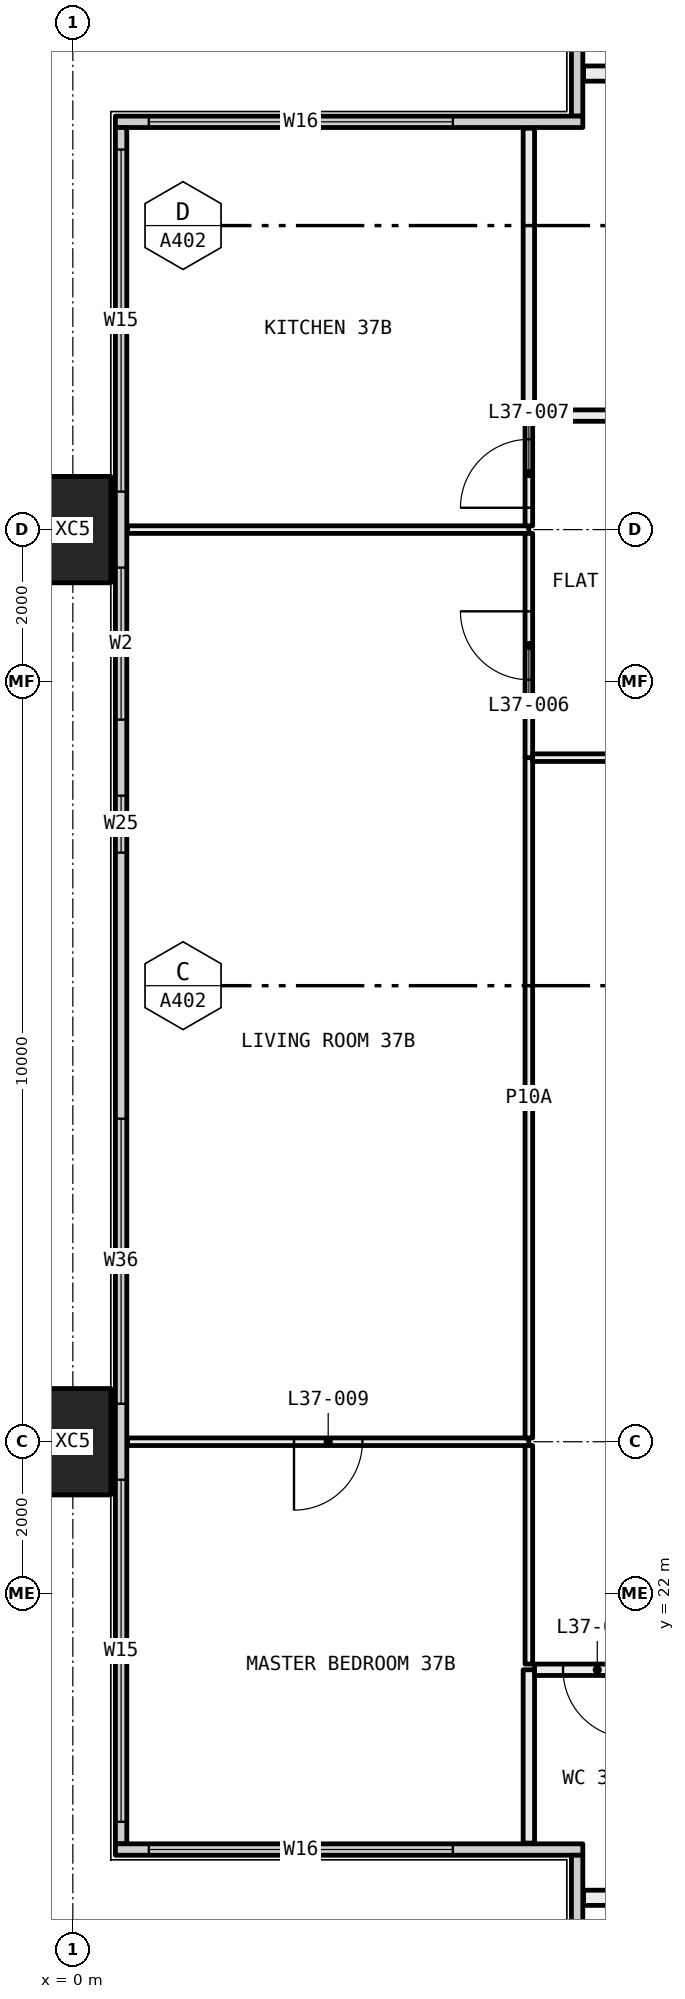
"""IFC4 building model, lengths in metres.
Left out: names, types, materials, properties, quantities, classifications, styles, units other than length and angle.
Written with IfcOpenShell. Run it as: python <this file> out.ifc"""

import sys

from ifc_helpers import new_model, si_unit, direction, frame, frame_2d, origin, origin_2d, place, context, subcontext, project, spatial, rectangle, hollow_rectangle, extrude, element, fill, save


model = new_model("IFC4")
c1 = context("Model", 3, precision=1e-05, world=origin(), true_north=direction((0.0, 1.0)))
c2 = subcontext(c1, "Body", "Model", "MODEL_VIEW")
j1 = project(units=[si_unit("LENGTHUNIT", "METRE"), si_unit("PLANEANGLEUNIT", "RADIAN")], contexts=[c1])
p1 = place(None, origin())
s1 = spatial("IfcSite", under=j1, at=p1, CompositionType="ELEMENT")
p2 = place(p1, origin())
s2 = spatial("IfcBuilding", under=s1, at=p2, CompositionType="ELEMENT")
p3 = place(p2, frame((0.0, 0.0, 141.45)))
s3 = spatial("IfcBuildingStorey", under=s2, at=p3, CompositionType="ELEMENT", Elevation=141.45)
for number, where, z_axis, x_axis in (
    (1, (0.0, 24.0, -0.4), (0.0, 0.0, 1.0), (0.0, 1.0, 0.0)),
    (2, (0.0, 36.0, -0.4), (0.0, 0.0, 1.0), (0.0, 1.0, 0.0)),
):
    element("IfcColumn", number, at=place(p3, frame(where, z_axis=z_axis, x_axis=x_axis)), inside=s3, PredefinedType="COLUMN", context=c2, shape_type="SweptSolid", body=[
        extrude(hollow_rectangle(XDim=1.4, YDim=1.0, WallThickness=0.055, at=origin_2d()), origin(), (0.0, 0.0, 1.0), 3.45),
    ])
p4 = place(p3, frame((6.635, 41.44, 0.0), z_axis=(0.0, 0.0, 1.0), x_axis=(0.0, 1.0, 0.0)))
e3 = element("IfcWall", 3, at=p4, inside=s3, PredefinedType="ELEMENTEDWALL", context=c2, shape_type="SweptSolid", body=[
    extrude(rectangle(XDim=5.85, YDim=0.15, at=frame_2d((2.925, 0.0))), origin(), (0.0, 0.0, 1.0), 3.05),
])
p5 = place(p4, frame((1.56, 0.0, 0.45)))
e4 = element("IfcOpeningElement", 4, at=p5, cuts=e3, PredefinedType="OPENING", context=c2, shape_type="SweptSolid", body=[
    extrude(rectangle(XDim=4.0, YDim=2.55, at=frame_2d((2.0, 1.275))), frame((0.0, 0.085, 0.0), z_axis=(0.0, -1.0, 0.0), x_axis=(1.0, 0.0, 0.0)), (0.0, 0.0, 1.0), 0.17),
])
p6 = place(p3, frame((0.56, 41.365, 0.0), z_axis=(0.0, 0.0, 1.0), x_axis=(1.0, 0.0, 0.0)))
e5 = element("IfcWall", 5, at=p6, inside=s3, PredefinedType="ELEMENTEDWALL", context=c2, shape_type="SweptSolid", body=[
    extrude(rectangle(XDim=6.15, YDim=0.15, at=frame_2d((3.075, 0.0))), origin(), (0.0, 0.0, 1.0), 3.05),
])
p7 = place(p6, frame((0.44, 0.0, 0.45)))
e6 = element("IfcOpeningElement", 6, at=p7, cuts=e5, PredefinedType="OPENING", context=c2, shape_type="SweptSolid", body=[
    extrude(rectangle(XDim=4.0, YDim=2.55, at=frame_2d((2.0, 1.275))), frame((0.0, 0.085, 0.0), z_axis=(0.0, -1.0, 0.0), x_axis=(1.0, 0.0, 0.0)), (0.0, 0.0, 1.0), 0.17),
])
p8 = place(p3, frame((0.635, 18.71, 0.0), z_axis=(0.0, 0.0, 1.0), x_axis=(0.0, 1.0, 0.0)))
e7 = element("IfcWall", 7, at=p8, inside=s3, PredefinedType="ELEMENTEDWALL", context=c2, shape_type="SweptSolid", body=[
    extrude(rectangle(XDim=22.58, YDim=0.15, at=frame_2d((11.29, 0.0))), origin(), (0.0, 0.0, 1.0), 3.05),
])
p9 = place(p8, frame((0.29, 0.0, 0.45)))
e8 = element("IfcOpeningElement", 8, at=p9, cuts=e7, PredefinedType="OPENING", context=c2, shape_type="SweptSolid", body=[
    extrude(rectangle(XDim=4.5, YDim=2.55, at=frame_2d((2.25, 1.275))), frame((0.0, 0.085, 0.0), z_axis=(0.0, -1.0, 0.0), x_axis=(1.0, 0.0, 0.0)), (0.0, 0.0, 1.0), 0.17),
])
p10 = place(p8, frame((5.79, 0.0, 0.45)))
e9 = element("IfcOpeningElement", 9, at=p10, cuts=e7, PredefinedType="OPENING", context=c2, shape_type="SweptSolid", body=[
    extrude(rectangle(XDim=3.75, YDim=2.55, at=frame_2d((1.875, 1.275))), frame((0.0, 0.085, 0.0), z_axis=(0.0, -1.0, 0.0), x_axis=(1.0, 0.0, 0.0)), (0.0, 0.0, 1.0), 0.17),
])
p11 = place(p8, frame((13.04, 0.0, 0.45)))
e10 = element("IfcOpeningElement", 10, at=p11, cuts=e7, PredefinedType="OPENING", context=c2, shape_type="SweptSolid", body=[
    extrude(rectangle(XDim=0.75, YDim=2.55, at=frame_2d((0.375, 1.275))), frame((0.0, 0.085, 0.0), z_axis=(0.0, -1.0, 0.0), x_axis=(1.0, 0.0, 0.0)), (0.0, 0.0, 1.0), 0.17),
])
p12 = place(p8, frame((14.79, 0.0, 0.45)))
e11 = element("IfcOpeningElement", 11, at=p12, cuts=e7, PredefinedType="OPENING", context=c2, shape_type="SweptSolid", body=[
    extrude(rectangle(XDim=2.0, YDim=2.55, at=frame_2d((1.0, 1.275))), frame((0.0, 0.085, 0.0), z_axis=(0.0, -1.0, 0.0), x_axis=(1.0, 0.0, 0.0)), (0.0, 0.0, 1.0), 0.17),
])
p13 = place(p8, frame((17.79, 0.0, 0.45)))
e12 = element("IfcOpeningElement", 12, at=p13, cuts=e7, PredefinedType="OPENING", context=c2, shape_type="SweptSolid", body=[
    extrude(rectangle(XDim=4.5, YDim=2.55, at=frame_2d((2.25, 1.275))), frame((0.0, 0.085, 0.0), z_axis=(0.0, -1.0, 0.0), x_axis=(1.0, 0.0, 0.0)), (0.0, 0.0, 1.0), 0.17),
])
p14 = place(p3, frame((0.56, 18.635, 0.0), z_axis=(0.0, 0.0, 1.0), x_axis=(1.0, 0.0, 0.0)))
e13 = element("IfcWall", 13, at=p14, inside=s3, PredefinedType="ELEMENTEDWALL", context=c2, shape_type="SweptSolid", body=[
    extrude(rectangle(XDim=6.15, YDim=0.15, at=frame_2d((3.075, 0.0))), origin(), (0.0, 0.0, 1.0), 3.05),
])
p15 = place(p14, frame((0.44, 0.0, 0.45)))
e14 = element("IfcOpeningElement", 14, at=p15, cuts=e13, PredefinedType="OPENING", context=c2, shape_type="SweptSolid", body=[
    extrude(rectangle(XDim=4.0, YDim=2.55, at=frame_2d((2.0, 1.275))), frame((0.0, 0.085, 0.0), z_axis=(0.0, -1.0, 0.0), x_axis=(1.0, 0.0, 0.0)), (0.0, 0.0, 1.0), 0.17),
])
p16 = place(p3, frame((6.635, 12.71, 0.0), z_axis=(0.0, 0.0, 1.0), x_axis=(0.0, 1.0, 0.0)))
e15 = element("IfcWall", 15, at=p16, inside=s3, PredefinedType="ELEMENTEDWALL", context=c2, shape_type="SweptSolid", body=[
    extrude(rectangle(XDim=5.85, YDim=0.15, at=frame_2d((2.925, 0.0))), origin(), (0.0, 0.0, 1.0), 3.05),
])
p17 = place(p16, frame((0.29, 0.0, 0.45)))
e16 = element("IfcOpeningElement", 16, at=p17, cuts=e15, PredefinedType="OPENING", context=c2, shape_type="SweptSolid", body=[
    extrude(rectangle(XDim=4.0, YDim=2.55, at=frame_2d((2.0, 1.275))), frame((0.0, 0.085, 0.0), z_axis=(0.0, -1.0, 0.0), x_axis=(1.0, 0.0, 0.0)), (0.0, 0.0, 1.0), 0.17),
])
p18 = place(p3, frame((7.8, 18.0, 0.0), z_axis=(0.0, 0.0, 1.0), x_axis=(-1.0, 0.0, 0.0)))
e17 = element("IfcWall", 17, at=p18, inside=s3, PredefinedType="PARTITIONING", context=c2, shape_type="SweptSolid", body=[
    extrude(rectangle(XDim=1.08, YDim=0.2, at=frame_2d((0.54, 0.0))), origin(), (0.0, 0.0, 1.0), 3.05),
])
p19 = place(p3, frame((6.0, 24.0, 0.0), z_axis=(0.0, 0.0, 1.0), x_axis=(-1.0, 0.0, 0.0)))
e18 = element("IfcWall", 18, at=p19, inside=s3, PredefinedType="PARTITIONING", context=c2, shape_type="SweptSolid", body=[
    extrude(rectangle(XDim=5.28, YDim=0.1, at=frame_2d((2.64, 0.0))), origin(), (0.0, 0.0, 1.0), 2.45),
])
p20 = place(p19, frame((2.19, 0.0, 0.0)))
e19 = element("IfcOpeningElement", 19, at=p20, cuts=e18, PredefinedType="OPENING", context=c2, shape_type="SweptSolid", body=[
    extrude(rectangle(XDim=0.9, YDim=2.1, at=frame_2d((0.45, 1.05))), frame((0.0, 0.06, 0.0), z_axis=(0.0, -1.0, 0.0), x_axis=(1.0, 0.0, 0.0)), (0.0, 0.0, 1.0), 0.12),
])
p21 = place(p3, frame((6.0, 18.72, 0.0), z_axis=(0.0, 0.0, 1.0), x_axis=(0.0, 1.0, 0.0)))
e20 = element("IfcWall", 20, at=p21, inside=s3, PredefinedType="PARTITIONING", context=c2, shape_type="SweptSolid", body=[
    extrude(rectangle(XDim=2.28, YDim=0.15, at=frame_2d((1.14, 0.0))), origin(), (0.0, 0.0, 1.0), 3.05),
])
p22 = place(p3, frame((6.0, 21.075, 0.0), z_axis=(0.0, 0.0, 1.0), x_axis=(0.0, 1.0, 0.0)))
e21 = element("IfcWall", 21, at=p22, inside=s3, PredefinedType="PARTITIONING", context=c2, shape_type="SweptSolid", body=[
    extrude(rectangle(XDim=2.875, YDim=0.1, at=frame_2d((1.438, 0.0))), origin(), (0.0, 0.0, 1.0), 2.45),
])
p23 = place(p3, frame((6.0, 36.0, 0.0), z_axis=(0.0, 0.0, 1.0), x_axis=(-1.0, 0.0, 0.0)))
e22 = element("IfcWall", 22, at=p23, inside=s3, PredefinedType="PARTITIONING", context=c2, shape_type="SweptSolid", body=[
    extrude(rectangle(XDim=5.28, YDim=0.1, at=frame_2d((2.64, 0.0))), origin(), (0.0, 0.0, 1.0), 2.45),
])
p24 = place(p3, frame((6.0, 24.05, 0.0), z_axis=(0.0, 0.0, 1.0), x_axis=(0.0, 1.0, 0.0)))
e23 = element("IfcWall", 23, at=p24, inside=s3, PredefinedType="PARTITIONING", context=c2, shape_type="SweptSolid", body=[
    extrude(rectangle(XDim=8.95, YDim=0.1, at=frame_2d((4.475, 0.0))), origin(), (0.0, 0.0, 1.0), 2.45),
])
p25 = place(p3, frame((6.0, 33.0, 0.0), z_axis=(0.0, 0.0, 1.0), x_axis=(0.0, 1.0, 0.0)))
e24 = element("IfcWall", 24, at=p25, inside=s3, PredefinedType="PARTITIONING", context=c2, shape_type="SweptSolid", body=[
    extrude(rectangle(XDim=2.95, YDim=0.1, at=frame_2d((1.475, 0.0))), origin(), (0.0, 0.0, 1.0), 2.45),
])
p26 = place(p25, frame((1.025, 0.0, 0.0)))
e25 = element("IfcOpeningElement", 25, at=p26, cuts=e24, PredefinedType="OPENING", context=c2, shape_type="SweptSolid", body=[
    extrude(rectangle(XDim=0.9, YDim=2.1, at=frame_2d((0.45, 1.05))), frame((0.0, 0.06, 0.0), z_axis=(0.0, -1.0, 0.0), x_axis=(1.0, 0.0, 0.0)), (0.0, 0.0, 1.0), 0.12),
])
p27 = place(p3, frame((6.0, 36.05, 0.0), z_axis=(0.0, 0.0, 1.0), x_axis=(0.0, 1.0, 0.0)))
e26 = element("IfcWall", 26, at=p27, inside=s3, PredefinedType="PARTITIONING", context=c2, shape_type="SweptSolid", body=[
    extrude(rectangle(XDim=1.375, YDim=0.1, at=frame_2d((0.688, 0.0))), origin(), (0.0, 0.0, 1.0), 2.45),
])
p28 = place(p27, frame((0.238, 0.0, 0.0)))
e27 = element("IfcOpeningElement", 27, at=p28, cuts=e26, PredefinedType="OPENING", context=c2, shape_type="SweptSolid", body=[
    extrude(rectangle(XDim=0.9, YDim=2.1, at=frame_2d((0.45, 1.05))), frame((0.0, 0.06, 0.0), z_axis=(0.0, -1.0, 0.0), x_axis=(1.0, 0.0, 0.0)), (0.0, 0.0, 1.0), 0.12),
])
p29 = place(p3, frame((6.0, 37.5, 0.0), z_axis=(0.0, 0.0, 1.0), x_axis=(0.0, 1.0, 0.0)))
e28 = element("IfcWall", 28, at=p29, inside=s3, PredefinedType="PARTITIONING", context=c2, shape_type="SweptSolid", body=[
    extrude(rectangle(XDim=3.78, YDim=0.15, at=frame_2d((1.89, 0.0))), origin(), (0.0, 0.0, 1.0), 3.05),
])
p30 = place(p3, frame((7.725, 21.0, 0.0), z_axis=(0.0, 0.0, 1.0), x_axis=(-1.0, 0.0, 0.0)))
e29 = element("IfcWall", 29, at=p30, inside=s3, PredefinedType="PARTITIONING", context=c2, shape_type="SweptSolid", body=[
    extrude(rectangle(XDim=1.65, YDim=0.15, at=frame_2d((0.825, 0.0))), origin(), (0.0, 0.0, 1.0), 3.05),
])
p31 = place(p30, frame((0.375, 0.0, 0.0)))
e30 = element("IfcOpeningElement", 30, at=p31, cuts=e29, PredefinedType="OPENING", context=c2, shape_type="SweptSolid", body=[
    extrude(rectangle(XDim=0.9, YDim=2.1, at=frame_2d((0.45, 1.05))), frame((0.0, 0.085, 0.0), z_axis=(0.0, -1.0, 0.0), x_axis=(1.0, 0.0, 0.0)), (0.0, 0.0, 1.0), 0.17),
])
p32 = place(p3, frame((10.0, 33.0, 0.0), z_axis=(0.0, 0.0, 1.0), x_axis=(-1.0, 0.0, 0.0)))
e31 = element("IfcWall", 31, at=p32, inside=s3, PredefinedType="PARTITIONING", context=c2, shape_type="SweptSolid", body=[
    extrude(rectangle(XDim=3.95, YDim=0.1, at=frame_2d((1.975, 0.0))), origin(), (0.0, 0.0, 1.0), 3.05),
])
p33 = place(p32, frame((1.525, 0.0, 0.0)))
e32 = element("IfcOpeningElement", 32, at=p33, cuts=e31, PredefinedType="OPENING", context=c2, shape_type="SweptSolid", body=[
    extrude(rectangle(XDim=0.9, YDim=2.1, at=frame_2d((0.45, 1.05))), frame((0.0, 0.06, 0.0), z_axis=(0.0, -1.0, 0.0), x_axis=(1.0, 0.0, 0.0)), (0.0, 0.0, 1.0), 0.12),
])
p34 = place(p3, frame((10.0, 37.5, 0.0), z_axis=(0.0, 0.0, 1.0), x_axis=(-1.0, 0.0, 0.0)))
e33 = element("IfcWall", 33, at=p34, inside=s3, PredefinedType="PARTITIONING", context=c2, shape_type="SweptSolid", body=[
    extrude(rectangle(XDim=3.925, YDim=0.15, at=frame_2d((1.962, 0.0))), origin(), (0.0, 0.0, 1.0), 3.05),
])
p35 = place(p34, frame((1.512, 0.0, 0.0)))
e34 = element("IfcOpeningElement", 34, at=p35, cuts=e33, PredefinedType="OPENING", context=c2, shape_type="SweptSolid", body=[
    extrude(rectangle(XDim=0.9, YDim=2.1, at=frame_2d((0.45, 1.05))), frame((0.0, 0.085, 0.0), z_axis=(0.0, -1.0, 0.0), x_axis=(1.0, 0.0, 0.0)), (0.0, 0.0, 1.0), 0.17),
])
p36 = place(p3, frame((10.1, 42.0, 0.0), z_axis=(0.0, 0.0, 1.0), x_axis=(-1.0, 0.0, 0.0)))
e35 = element("IfcWall", 35, at=p36, inside=s3, PredefinedType="PARTITIONING", context=c2, shape_type="SweptSolid", body=[
    extrude(rectangle(XDim=3.38, YDim=0.2, at=frame_2d((1.69, 0.0))), origin(), (0.0, 0.0, 1.0), 3.05),
])
p37 = place(p7, origin())
e36 = element("IfcWindow", 36, at=p37, inside=s3, PartitioningType="SINGLE_PANEL", PredefinedType="WINDOW", context=c2, shape_type="SweptSolid", body=[
    extrude(rectangle(XDim=4.0, YDim=2.55, at=frame_2d((2.0, 1.275))), frame((0.0, 0.03, 0.0), z_axis=(0.0, -1.0, 0.0), x_axis=(1.0, 0.0, 0.0)), (0.0, 0.0, 1.0), 0.06),
])
fill(e6, e36)
p38 = place(p9, origin())
e37 = element("IfcWindow", 37, at=p38, inside=s3, PartitioningType="SINGLE_PANEL", PredefinedType="WINDOW", context=c2, shape_type="SweptSolid", body=[
    extrude(rectangle(XDim=4.5, YDim=2.55, at=frame_2d((2.25, 1.275))), frame((0.0, 0.03, 0.0), z_axis=(0.0, -1.0, 0.0), x_axis=(1.0, 0.0, 0.0)), (0.0, 0.0, 1.0), 0.06),
])
fill(e8, e37)
p39 = place(p10, origin())
e38 = element("IfcWindow", 38, at=p39, inside=s3, PartitioningType="SINGLE_PANEL", PredefinedType="WINDOW", context=c2, shape_type="SweptSolid", body=[
    extrude(rectangle(XDim=3.75, YDim=2.55, at=frame_2d((1.875, 1.275))), frame((0.0, 0.03, 0.0), z_axis=(0.0, -1.0, 0.0), x_axis=(1.0, 0.0, 0.0)), (0.0, 0.0, 1.0), 0.06),
])
fill(e9, e38)
p40 = place(p11, origin())
e39 = element("IfcWindow", 39, at=p40, inside=s3, PartitioningType="SINGLE_PANEL", PredefinedType="WINDOW", context=c2, shape_type="SweptSolid", body=[
    extrude(rectangle(XDim=0.75, YDim=2.55, at=frame_2d((0.375, 1.275))), frame((0.0, 0.03, 0.0), z_axis=(0.0, -1.0, 0.0), x_axis=(1.0, 0.0, 0.0)), (0.0, 0.0, 1.0), 0.06),
])
fill(e10, e39)
p41 = place(p12, origin())
e40 = element("IfcWindow", 40, at=p41, inside=s3, PartitioningType="SINGLE_PANEL", PredefinedType="WINDOW", context=c2, shape_type="SweptSolid", body=[
    extrude(rectangle(XDim=2.0, YDim=2.55, at=frame_2d((1.0, 1.275))), frame((0.0, 0.03, 0.0), z_axis=(0.0, -1.0, 0.0), x_axis=(1.0, 0.0, 0.0)), (0.0, 0.0, 1.0), 0.06),
])
fill(e11, e40)
p42 = place(p13, origin())
e41 = element("IfcWindow", 41, at=p42, inside=s3, PartitioningType="SINGLE_PANEL", PredefinedType="WINDOW", context=c2, shape_type="SweptSolid", body=[
    extrude(rectangle(XDim=4.5, YDim=2.55, at=frame_2d((2.25, 1.275))), frame((0.0, 0.03, 0.0), z_axis=(0.0, -1.0, 0.0), x_axis=(1.0, 0.0, 0.0)), (0.0, 0.0, 1.0), 0.06),
])
fill(e12, e41)
p43 = place(p15, origin())
e42 = element("IfcWindow", 42, at=p43, inside=s3, PartitioningType="SINGLE_PANEL", PredefinedType="WINDOW", context=c2, shape_type="SweptSolid", body=[
    extrude(rectangle(XDim=4.0, YDim=2.55, at=frame_2d((2.0, 1.275))), frame((0.0, 0.03, 0.0), z_axis=(0.0, -1.0, 0.0), x_axis=(1.0, 0.0, 0.0)), (0.0, 0.0, 1.0), 0.06),
])
fill(e14, e42)
p44 = place(p26, origin())
e43 = element("IfcDoor", 43, at=p44, inside=s3, OperationType="SINGLE_SWING_LEFT", PredefinedType="DOOR", context=c2, shape_type="SweptSolid", body=[
    extrude(rectangle(XDim=0.9, YDim=2.1, at=frame_2d((0.45, 1.05))), frame((0.0, 0.025, 0.0), z_axis=(0.0, -1.0, 0.0), x_axis=(1.0, 0.0, 0.0)), (0.0, 0.0, 1.0), 0.05),
])
fill(e25, e43)
p45 = place(p28, origin())
e44 = element("IfcDoor", 44, at=p45, inside=s3, OperationType="SINGLE_SWING_RIGHT", PredefinedType="DOOR", context=c2, shape_type="SweptSolid", body=[
    extrude(rectangle(XDim=0.9, YDim=2.1, at=frame_2d((0.45, 1.05))), frame((0.0, 0.025, 0.0), z_axis=(0.0, -1.0, 0.0), x_axis=(1.0, 0.0, 0.0)), (0.0, 0.0, 1.0), 0.05),
])
fill(e27, e44)
p46 = place(p20, origin())
e45 = element("IfcDoor", 45, at=p46, inside=s3, OperationType="SINGLE_SWING_LEFT", PredefinedType="DOOR", context=c2, shape_type="SweptSolid", body=[
    extrude(rectangle(XDim=0.9, YDim=2.1, at=frame_2d((0.45, 1.05))), frame((0.0, 0.025, 0.0), z_axis=(0.0, -1.0, 0.0), x_axis=(1.0, 0.0, 0.0)), (0.0, 0.0, 1.0), 0.05),
])
fill(e19, e45)
p47 = place(p31, origin())
e46 = element("IfcDoor", 46, at=p47, inside=s3, OperationType="SINGLE_SWING_RIGHT", PredefinedType="DOOR", context=c2, shape_type="SweptSolid", body=[
    extrude(rectangle(XDim=0.9, YDim=2.1, at=frame_2d((0.45, 1.05))), frame((0.0, 0.025, 0.0), z_axis=(0.0, -1.0, 0.0), x_axis=(1.0, 0.0, 0.0)), (0.0, 0.0, 1.0), 0.05),
])
fill(e30, e46)
save(model, sys.argv[1])
